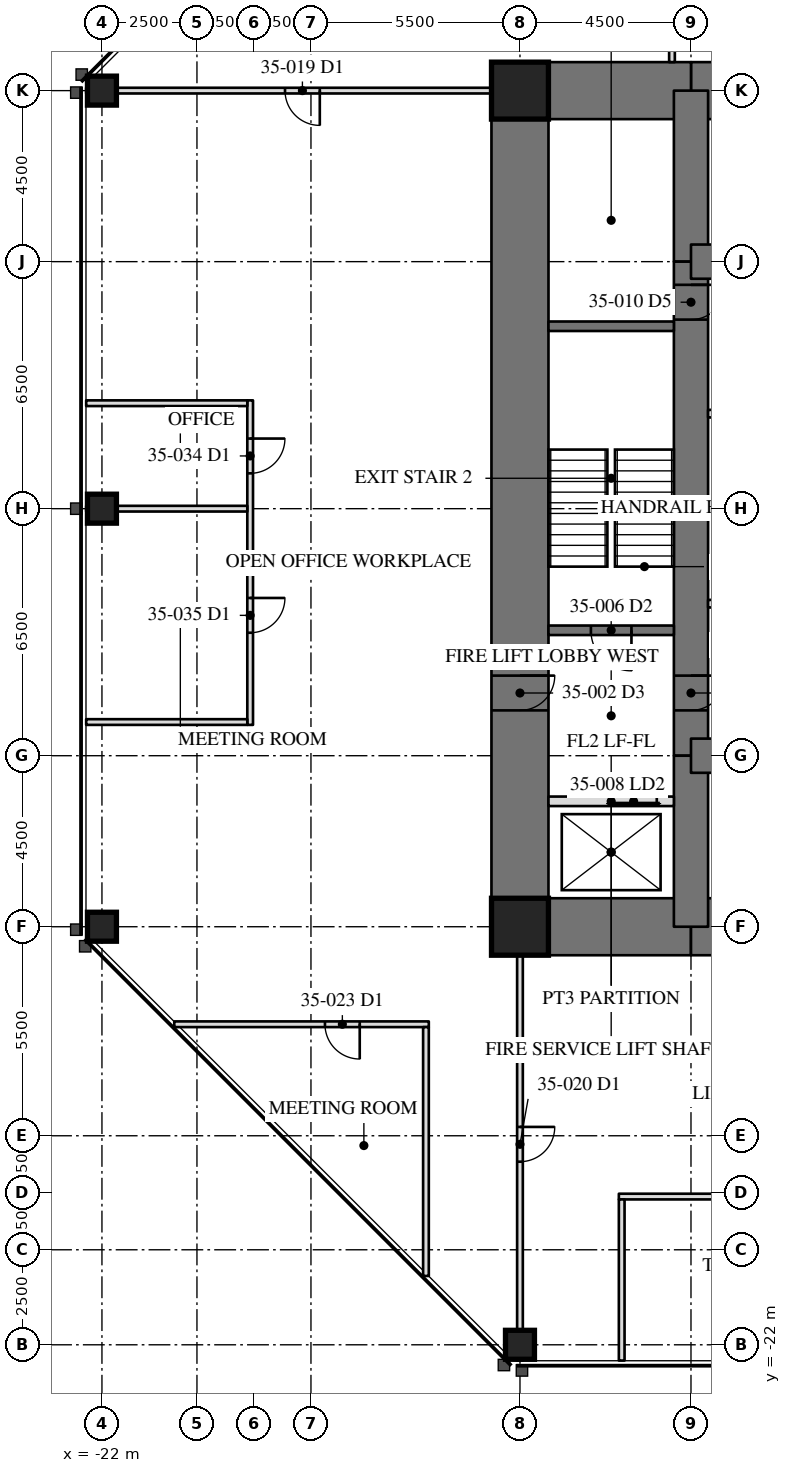
"""IFC4 building model, lengths in metres.
Left out: names, types, materials, properties, quantities, classifications, styles, units other than length and angle.
Written with IfcOpenShell. Run it as: python <this file> out.ifc"""

import sys

from ifc_helpers import new_model, si_unit, direction, frame, frame_2d, origin, origin_2d, place, context, subcontext, project, spatial, rectangle, hollow_rectangle, extrude, element, fill, save


model = new_model("IFC4")
c1 = context("Model", 3, precision=1e-05, world=origin(), true_north=direction((0.0, 1.0)))
c2 = subcontext(c1, "Body", "Model", "MODEL_VIEW")
j1 = project(units=[si_unit("LENGTHUNIT", "METRE"), si_unit("PLANEANGLEUNIT", "RADIAN")], contexts=[c1])
p1 = place(None, origin())
s1 = spatial("IfcSite", under=j1, at=p1, CompositionType="ELEMENT")
p2 = place(p1, origin())
s2 = spatial("IfcBuilding", under=s1, at=p2, CompositionType="ELEMENT")
p3 = place(p2, frame((0.0, 0.0, 150.0)))
s3 = spatial("IfcBuildingStorey", under=s2, at=p3, CompositionType="ELEMENT", Elevation=150.0)
for number, where, z_axis, x_axis in (
    (1, (-22.0, 0.0, 0.0), (0.0, 0.0, 1.0), (0.0, 1.0, 0.0)),
    (2, (-22.0, -11.0, 0.0), (0.0, 0.0, 1.0), (0.0, 1.0, 0.0)),
    (3, (-11.0, -22.0, 0.0), (0.0, 0.0, 1.0), (1.0, 0.0, 0.0)),
    (4, (-22.0, 11.0, 0.0), (0.0, 0.0, 1.0), (0.0, 1.0, 0.0)),
):
    element("IfcColumn", number, at=place(p3, frame(where, z_axis=z_axis, x_axis=x_axis)), inside=s3, PredefinedType="COLUMN", context=c2, shape_type="SweptSolid", body=[
        extrude(hollow_rectangle(XDim=0.762, YDim=0.762, WallThickness=0.076, at=origin_2d()), origin(), (0.0, 0.0, 1.0), 4.1),
    ])
p4 = place(p3, frame((-11.0, 11.0, 0.0), z_axis=(0.0, 0.0, 1.0), x_axis=(0.0, -1.0, 0.0)))
e5 = element("IfcWall", 5, at=p4, inside=s3, PredefinedType="SHEAR", context=c2, shape_type="SweptSolid", body=[
    extrude(rectangle(XDim=22.0, YDim=1.5, at=frame_2d((11.0, 0.0))), origin(), (0.0, 0.0, 1.0), 4.1),
])
p5 = place(p4, frame((15.393, 0.0, 0.0)))
e6 = element("IfcOpeningElement", 6, at=p5, cuts=e5, PredefinedType="OPENING", context=c2, shape_type="SweptSolid", body=[
    extrude(rectangle(XDim=0.915, YDim=2.134, at=frame_2d((0.458, 1.067))), frame((0.0, 0.76, 0.0), z_axis=(0.0, -1.0, 0.0), x_axis=(1.0, 0.0, 0.0)), (0.0, 0.0, 1.0), 1.52),
])
p6 = place(p3, frame((6.5, 11.0, 0.0), z_axis=(0.0, 0.0, 1.0), x_axis=(-1.0, 0.0, 0.0)))
e7 = element("IfcWall", 7, at=p6, inside=s3, PredefinedType="SHEAR", context=c2, shape_type="SweptSolid", body=[
    extrude(rectangle(XDim=13.0, YDim=1.5, at=frame_2d((6.5, 0.0))), origin(), (0.0, 0.0, 1.0), 4.1),
])
for number, where, z_axis, x_axis in (
    (8, (-6.5, 11.0, 0.0), (0.0, 0.0, 1.0), (-1.0, 0.0, 0.0)),
    (9, (-11.0, -11.0, 0.0), (0.0, 0.0, 1.0), (1.0, 0.0, 0.0)),
):
    element("IfcWall", number, at=place(p3, frame(where, z_axis=z_axis, x_axis=x_axis)), inside=s3, PredefinedType="SHEAR", context=c2, shape_type="SweptSolid", body=[
        extrude(rectangle(XDim=4.5, YDim=1.5, at=frame_2d((2.25, 0.0))), origin(), (0.0, 0.0, 1.0), 4.1),
    ])
p7 = place(p3, frame((-6.5, -11.0, 0.0), z_axis=(0.0, 0.0, 1.0), x_axis=(1.0, 0.0, 0.0)))
e10 = element("IfcWall", 10, at=p7, inside=s3, PredefinedType="SHEAR", context=c2, shape_type="SweptSolid", body=[
    extrude(rectangle(XDim=13.0, YDim=1.5, at=frame_2d((6.5, 0.0))), origin(), (0.0, 0.0, 1.0), 4.1),
])
p8 = place(p3, frame((-6.5, 11.0, 0.0), z_axis=(0.0, 0.0, 1.0), x_axis=(0.0, -1.0, 0.0)))
e11 = element("IfcWall", 11, at=p8, inside=s3, PredefinedType="SHEAR", context=c2, shape_type="SweptSolid", body=[
    extrude(rectangle(XDim=4.5, YDim=0.9, at=frame_2d((2.25, 0.0))), origin(), (0.0, 0.0, 1.0), 4.1),
])
p9 = place(p3, frame((-6.5, 6.5, 0.0), z_axis=(0.0, 0.0, 1.0), x_axis=(0.0, -1.0, 0.0)))
e12 = element("IfcWall", 12, at=p9, inside=s3, PredefinedType="SHEAR", context=c2, shape_type="SweptSolid", body=[
    extrude(rectangle(XDim=13.0, YDim=0.9, at=frame_2d((6.5, 0.0))), origin(), (0.0, 0.0, 1.0), 4.1),
])
p10 = place(p9, frame((10.893, 0.0, 0.0)))
e13 = element("IfcOpeningElement", 13, at=p10, cuts=e12, PredefinedType="OPENING", context=c2, shape_type="SweptSolid", body=[
    extrude(rectangle(XDim=0.915, YDim=2.134, at=frame_2d((0.458, 1.067))), frame((0.0, 0.46, 0.0), z_axis=(0.0, -1.0, 0.0), x_axis=(1.0, 0.0, 0.0)), (0.0, 0.0, 1.0), 0.92),
])
p11 = place(p9, frame((0.61, 0.0, 0.0)))
e14 = element("IfcOpeningElement", 14, at=p11, cuts=e12, PredefinedType="OPENING", context=c2, shape_type="SweptSolid", body=[
    extrude(rectangle(XDim=0.915, YDim=2.134, at=frame_2d((0.458, 1.067))), frame((0.0, 0.46, 0.0), z_axis=(0.0, -1.0, 0.0), x_axis=(1.0, 0.0, 0.0)), (0.0, 0.0, 1.0), 0.92),
])
p12 = place(p3, frame((-6.5, -6.5, 0.0), z_axis=(0.0, 0.0, 1.0), x_axis=(0.0, -1.0, 0.0)))
e15 = element("IfcWall", 15, at=p12, inside=s3, PredefinedType="SHEAR", context=c2, shape_type="SweptSolid", body=[
    extrude(rectangle(XDim=4.5, YDim=0.9, at=frame_2d((2.25, 0.0))), origin(), (0.0, 0.0, 1.0), 4.1),
])
p13 = place(p3, frame((6.5, 6.5, 0.0), z_axis=(0.0, 0.0, 1.0), x_axis=(-1.0, 0.0, 0.0)))
e16 = element("IfcWall", 16, at=p13, inside=s3, PredefinedType="SHEAR", context=c2, shape_type="SweptSolid", body=[
    extrude(rectangle(XDim=13.0, YDim=0.9, at=frame_2d((6.5, 0.0))), origin(), (0.0, 0.0, 1.0), 4.1),
])
p14 = place(p3, frame((-6.5, -6.5, 0.0), z_axis=(0.0, 0.0, 1.0), x_axis=(1.0, 0.0, 0.0)))
e17 = element("IfcWall", 17, at=p14, inside=s3, PredefinedType="SHEAR", context=c2, shape_type="SweptSolid", body=[
    extrude(rectangle(XDim=13.0, YDim=0.9, at=frame_2d((6.5, 0.0))), origin(), (0.0, 0.0, 1.0), 4.1),
])
p15 = place(p14, frame((1.267, 0.0, 0.0)))
e18 = element("IfcOpeningElement", 18, at=p15, cuts=e17, PredefinedType="OPENING", context=c2, shape_type="SweptSolid", body=[
    extrude(rectangle(XDim=1.067, YDim=2.134, at=frame_2d((0.533, 1.067))), frame((0.0, 0.46, 0.0), z_axis=(0.0, -1.0, 0.0), x_axis=(1.0, 0.0, 0.0)), (0.0, 0.0, 1.0), 0.92),
])
p16 = place(p14, frame((4.342, 0.0, 0.0)))
e19 = element("IfcOpeningElement", 19, at=p16, cuts=e17, PredefinedType="OPENING", context=c2, shape_type="SweptSolid", body=[
    extrude(rectangle(XDim=1.067, YDim=2.134, at=frame_2d((0.533, 1.067))), frame((0.0, 0.46, 0.0), z_axis=(0.0, -1.0, 0.0), x_axis=(1.0, 0.0, 0.0)), (0.0, 0.0, 1.0), 0.92),
])
p17 = place(p14, frame((7.592, 0.0, 0.0)))
e20 = element("IfcOpeningElement", 20, at=p17, cuts=e17, PredefinedType="OPENING", context=c2, shape_type="SweptSolid", body=[
    extrude(rectangle(XDim=1.067, YDim=2.134, at=frame_2d((0.533, 1.067))), frame((0.0, 0.46, 0.0), z_axis=(0.0, -1.0, 0.0), x_axis=(1.0, 0.0, 0.0)), (0.0, 0.0, 1.0), 0.92),
])
p18 = place(p14, frame((10.667, 0.0, 0.0)))
e21 = element("IfcOpeningElement", 21, at=p18, cuts=e17, PredefinedType="OPENING", context=c2, shape_type="SweptSolid", body=[
    extrude(rectangle(XDim=1.067, YDim=2.134, at=frame_2d((0.533, 1.067))), frame((0.0, 0.46, 0.0), z_axis=(0.0, -1.0, 0.0), x_axis=(1.0, 0.0, 0.0)), (0.0, 0.0, 1.0), 0.92),
])
for number, where, z_axis, x_axis in (
    (22, (-11.0, 11.0, 0.0), (0.0, 0.0, 1.0), (1.0, 0.0, 0.0)),
    (23, (-11.0, -11.0, 0.0), (0.0, 0.0, 1.0), (1.0, 0.0, 0.0)),
):
    element("IfcColumn", number, at=place(p3, frame(where, z_axis=z_axis, x_axis=x_axis)), inside=s3, PredefinedType="COLUMN", context=c2, shape_type="SweptSolid", body=[
        extrude(hollow_rectangle(XDim=1.499, YDim=1.499, WallThickness=0.102, at=origin_2d()), origin(), (0.0, 0.0, 1.0), 4.1),
    ])
p19 = place(p3, frame((-6.95, 4.8, 0.0), z_axis=(0.0, 0.0, 1.0), x_axis=(-1.0, 0.0, 0.0)))
e24 = element("IfcWall", 24, at=p19, inside=s3, PredefinedType="SOLIDWALL", context=c2, shape_type="SweptSolid", body=[
    extrude(rectangle(XDim=3.3, YDim=0.25, at=frame_2d((1.65, 0.0))), origin(), (0.0, 0.0, 1.0), 3.91),
])
p20 = place(p3, frame((-6.95, -3.2, 0.0), z_axis=(0.0, 0.0, 1.0), x_axis=(-1.0, 0.0, 0.0)))
e25 = element("IfcWall", 25, at=p20, inside=s3, PredefinedType="SOLIDWALL", context=c2, shape_type="SweptSolid", body=[
    extrude(rectangle(XDim=3.3, YDim=0.25, at=frame_2d((1.65, 0.0))), origin(), (0.0, 0.0, 1.0), 3.91),
])
p21 = place(p20, frame((1.116, 0.0, 0.0)))
e26 = element("IfcOpeningElement", 26, at=p21, cuts=e25, PredefinedType="OPENING", context=c2, shape_type="SweptSolid", body=[
    extrude(rectangle(XDim=1.067, YDim=2.134, at=frame_2d((0.533, 1.067))), frame((0.0, 0.135, 0.0), z_axis=(0.0, -1.0, 0.0), x_axis=(1.0, 0.0, 0.0)), (0.0, 0.0, 1.0), 0.27),
])
p22 = place(p3, frame((-6.95, -7.7, 0.0), z_axis=(0.0, 0.0, 1.0), x_axis=(-1.0, 0.0, 0.0)))
e27 = element("IfcWall", 27, at=p22, inside=s3, PredefinedType="PARTITIONING", context=c2, shape_type="SweptSolid", body=[
    extrude(rectangle(XDim=3.3, YDim=0.25, at=frame_2d((1.65, 0.0))), origin(), (0.0, 0.0, 1.0), 3.91),
])
p23 = place(p22, frame((0.45, 0.0, 0.0)))
e28 = element("IfcOpeningElement", 28, at=p23, cuts=e27, PredefinedType="OPENING", context=c2, shape_type="SweptSolid", body=[
    extrude(rectangle(XDim=1.219, YDim=2.134, at=frame_2d((0.609, 1.067))), frame((0.0, 0.135, 0.0), z_axis=(0.0, -1.0, 0.0), x_axis=(1.0, 0.0, 0.0)), (0.0, 0.0, 1.0), 0.27),
])
p24 = place(p3, frame((-6.05, 2.5, 0.0), z_axis=(0.0, 0.0, 1.0), x_axis=(1.0, 0.0, 0.0)))
e29 = element("IfcWall", 29, at=p24, inside=s3, PredefinedType="PARTITIONING", context=c2, shape_type="SweptSolid", body=[
    extrude(rectangle(XDim=12.1, YDim=0.2, at=frame_2d((6.05, 0.0))), origin(), (0.0, 0.0, 1.0), 3.91),
])
p25 = place(p24, frame((2.268, 0.0, 0.0)))
e30 = element("IfcOpeningElement", 30, at=p25, cuts=e29, PredefinedType="OPENING", context=c2, shape_type="SweptSolid", body=[
    extrude(rectangle(XDim=0.915, YDim=2.134, at=frame_2d((0.458, 1.067))), frame((0.0, 0.11, 0.0), z_axis=(0.0, -1.0, 0.0), x_axis=(1.0, 0.0, 0.0)), (0.0, 0.0, 1.0), 0.22),
])
p26 = place(p24, frame((10.617, 0.0, 0.0)))
e31 = element("IfcOpeningElement", 31, at=p26, cuts=e29, PredefinedType="OPENING", context=c2, shape_type="SweptSolid", body=[
    extrude(rectangle(XDim=0.915, YDim=2.134, at=frame_2d((0.458, 1.067))), frame((0.0, 0.11, 0.0), z_axis=(0.0, -1.0, 0.0), x_axis=(1.0, 0.0, 0.0)), (0.0, 0.0, 1.0), 0.22),
])
p27 = place(p3, frame((6.05, -2.5, 0.0), z_axis=(0.0, 0.0, 1.0), x_axis=(-1.0, 0.0, 0.0)))
e32 = element("IfcWall", 32, at=p27, inside=s3, PredefinedType="PARTITIONING", context=c2, shape_type="SweptSolid", body=[
    extrude(rectangle(XDim=12.1, YDim=0.2, at=frame_2d((6.05, 0.0))), origin(), (0.0, 0.0, 1.0), 3.91),
])
p28 = place(p27, frame((3.893, 0.0, 0.0)))
e33 = element("IfcOpeningElement", 33, at=p28, cuts=e32, PredefinedType="OPENING", context=c2, shape_type="SweptSolid", body=[
    extrude(rectangle(XDim=0.915, YDim=2.134, at=frame_2d((0.458, 1.067))), frame((0.0, 0.11, 0.0), z_axis=(0.0, -1.0, 0.0), x_axis=(1.0, 0.0, 0.0)), (0.0, 0.0, 1.0), 0.22),
])
p29 = place(p3, frame((-11.75, 11.0, 0.0), z_axis=(0.0, 0.0, 1.0), x_axis=(-1.0, 0.0, 0.0)))
e34 = element("IfcWall", 34, at=p29, inside=s3, PredefinedType="PARTITIONING", context=c2, shape_type="SweptSolid", body=[
    extrude(rectangle(XDim=10.665, YDim=0.15, at=frame_2d((5.333, 0.0))), origin(), (0.0, 0.0, 1.0), 3.326),
])
p30 = place(p29, frame((4.518, 0.0, 0.0)))
e35 = element("IfcOpeningElement", 35, at=p30, cuts=e34, PredefinedType="OPENING", context=c2, shape_type="SweptSolid", body=[
    extrude(rectangle(XDim=0.915, YDim=2.134, at=frame_2d((0.458, 1.067))), frame((0.0, 0.085, 0.0), z_axis=(0.0, -1.0, 0.0), x_axis=(1.0, 0.0, 0.0)), (0.0, 0.0, 1.0), 0.17),
])
p31 = place(p3, frame((-11.0, -11.75, 0.0), z_axis=(0.0, 0.0, 1.0), x_axis=(0.0, -1.0, 0.0)))
e36 = element("IfcWall", 36, at=p31, inside=s3, PredefinedType="PARTITIONING", context=c2, shape_type="SweptSolid", body=[
    extrude(rectangle(XDim=10.665, YDim=0.15, at=frame_2d((5.333, 0.0))), origin(), (0.0, 0.0, 1.0), 3.326),
])
p32 = place(p31, frame((4.518, 0.0, 0.0)))
e37 = element("IfcOpeningElement", 37, at=p32, cuts=e36, PredefinedType="OPENING", context=c2, shape_type="SweptSolid", body=[
    extrude(rectangle(XDim=0.915, YDim=2.134, at=frame_2d((0.458, 1.067))), frame((0.0, 0.085, 0.0), z_axis=(0.0, -1.0, 0.0), x_axis=(1.0, 0.0, 0.0)), (0.0, 0.0, 1.0), 0.17),
])
p33 = place(p3, frame((-13.399, -13.566, 0.0), z_axis=(0.0, 0.0, 1.0), x_axis=(-1.0, 0.0, 0.0)))
e38 = element("IfcWall", 38, at=p33, inside=s3, PredefinedType="PARTITIONING", context=c2, shape_type="SweptSolid", body=[
    extrude(rectangle(XDim=6.698, YDim=0.15, at=frame_2d((3.349, 0.0))), origin(), (0.0, 0.0, 1.0), 3.91),
])
p34 = place(p33, frame((1.817, 0.0, 0.0)))
e39 = element("IfcOpeningElement", 39, at=p34, cuts=e38, PredefinedType="OPENING", context=c2, shape_type="SweptSolid", body=[
    extrude(rectangle(XDim=0.915, YDim=2.134, at=frame_2d((0.458, 1.067))), frame((0.0, 0.085, 0.0), z_axis=(0.0, -1.0, 0.0), x_axis=(1.0, 0.0, 0.0)), (0.0, 0.0, 1.0), 0.17),
])
p35 = place(p3, frame((-13.474, -13.641, 0.0), z_axis=(0.0, 0.0, 1.0), x_axis=(0.0, -1.0, 0.0)))
e40 = element("IfcWall", 40, at=p35, inside=s3, PredefinedType="PARTITIONING", context=c2, shape_type="SweptSolid", body=[
    extrude(rectangle(XDim=6.548, YDim=0.15, at=frame_2d((3.274, 0.0))), origin(), (0.0, 0.0, 1.0), 3.91),
])
p36 = place(p3, frame((-8.398, -18.1, 0.0), z_axis=(0.0, 0.0, 1.0), x_axis=(1.0, 0.0, 0.0)))
e41 = element("IfcWall", 41, at=p36, inside=s3, PredefinedType="PARTITIONING", context=c2, shape_type="SweptSolid", body=[
    extrude(rectangle(XDim=16.894, YDim=0.15, at=frame_2d((8.447, 0.0))), origin(), (0.0, 0.0, 1.0), 3.91),
])
p37 = place(p36, frame((3.779, 0.0, 0.0)))
e42 = element("IfcOpeningElement", 42, at=p37, cuts=e41, PredefinedType="OPENING", context=c2, shape_type="SweptSolid", body=[
    extrude(rectangle(XDim=0.915, YDim=2.134, at=frame_2d((0.458, 1.067))), frame((0.0, 0.085, 0.0), z_axis=(0.0, -1.0, 0.0), x_axis=(1.0, 0.0, 0.0)), (0.0, 0.0, 1.0), 0.17),
])
p38 = place(p36, frame((10.748, 0.0, 0.0)))
e43 = element("IfcOpeningElement", 43, at=p38, cuts=e41, PredefinedType="OPENING", context=c2, shape_type="SweptSolid", body=[
    extrude(rectangle(XDim=0.915, YDim=2.134, at=frame_2d((0.458, 1.067))), frame((0.0, 0.085, 0.0), z_axis=(0.0, -1.0, 0.0), x_axis=(1.0, 0.0, 0.0)), (0.0, 0.0, 1.0), 0.17),
])
p39 = place(p36, frame((14.958, 0.0, 0.0)))
e44 = element("IfcOpeningElement", 44, at=p39, cuts=e41, PredefinedType="OPENING", context=c2, shape_type="SweptSolid", body=[
    extrude(rectangle(XDim=0.915, YDim=2.134, at=frame_2d((0.458, 1.067))), frame((0.0, 0.085, 0.0), z_axis=(0.0, -1.0, 0.0), x_axis=(1.0, 0.0, 0.0)), (0.0, 0.0, 1.0), 0.17),
])
p40 = place(p3, frame((-8.323, -18.175, 0.0), z_axis=(0.0, 0.0, 1.0), x_axis=(0.0, -1.0, 0.0)))
e45 = element("IfcWall", 45, at=p40, inside=s3, PredefinedType="PARTITIONING", context=c2, shape_type="SweptSolid", body=[
    extrude(rectangle(XDim=4.24, YDim=0.15, at=frame_2d((2.12, 0.0))), origin(), (0.0, 0.0, 1.0), 3.91),
])
p41 = place(p3, frame((-18.1, 2.85, 0.0), z_axis=(0.0, 0.0, 1.0), x_axis=(0.0, -1.0, 0.0)))
e46 = element("IfcWall", 46, at=p41, inside=s3, PredefinedType="PARTITIONING", context=c2, shape_type="SweptSolid", body=[
    extrude(rectangle(XDim=8.539, YDim=0.15, at=frame_2d((4.27, 0.0))), origin(), (0.0, 0.0, 1.0), 3.91),
])
p42 = place(p41, frame((1.005, 0.0, 0.0)))
e47 = element("IfcOpeningElement", 47, at=p42, cuts=e46, PredefinedType="OPENING", context=c2, shape_type="SweptSolid", body=[
    extrude(rectangle(XDim=0.915, YDim=2.134, at=frame_2d((0.458, 1.067))), frame((0.0, 0.085, 0.0), z_axis=(0.0, -1.0, 0.0), x_axis=(1.0, 0.0, 0.0)), (0.0, 0.0, 1.0), 0.17),
])
p43 = place(p41, frame((5.199, 0.0, 0.0)))
e48 = element("IfcOpeningElement", 48, at=p43, cuts=e46, PredefinedType="OPENING", context=c2, shape_type="SweptSolid", body=[
    extrude(rectangle(XDim=0.915, YDim=2.134, at=frame_2d((0.458, 1.067))), frame((0.0, 0.085, 0.0), z_axis=(0.0, -1.0, 0.0), x_axis=(1.0, 0.0, 0.0)), (0.0, 0.0, 1.0), 0.17),
])
p44 = place(p3, frame((-18.175, 2.775, 0.0), z_axis=(0.0, 0.0, 1.0), x_axis=(-1.0, 0.0, 0.0)))
e49 = element("IfcWall", 49, at=p44, inside=s3, PredefinedType="PARTITIONING", context=c2, shape_type="SweptSolid", body=[
    extrude(rectangle(XDim=4.24, YDim=0.15, at=frame_2d((2.12, 0.0))), origin(), (0.0, 0.0, 1.0), 3.91),
])
p45 = place(p3, frame((-18.175, 0.0, 0.0), z_axis=(0.0, 0.0, 1.0), x_axis=(-1.0, 0.0, 0.0)))
e50 = element("IfcWall", 50, at=p45, inside=s3, PredefinedType="PARTITIONING", context=c2, shape_type="SweptSolid", body=[
    extrude(rectangle(XDim=4.24, YDim=0.15, at=frame_2d((2.12, 0.0))), origin(), (0.0, 0.0, 1.0), 3.326),
])
p46 = place(p3, frame((-18.175, -5.614, 0.0), z_axis=(0.0, 0.0, 1.0), x_axis=(-1.0, 0.0, 0.0)))
e51 = element("IfcWall", 51, at=p46, inside=s3, PredefinedType="PARTITIONING", context=c2, shape_type="SweptSolid", body=[
    extrude(rectangle(XDim=4.24, YDim=0.15, at=frame_2d((2.12, 0.0))), origin(), (0.0, 0.0, 1.0), 3.91),
])
p47 = place(p3, frame((-7.0, 14.675, 0.0), z_axis=(0.0, 0.0, 1.0), x_axis=(0.0, -1.0, 0.0)))
e52 = element("IfcWall", 52, at=p47, inside=s3, PredefinedType="PARTITIONING", context=c2, shape_type="SweptSolid", body=[
    extrude(rectangle(XDim=2.925, YDim=0.15, at=frame_2d((1.462, 0.0))), origin(), (0.0, 0.0, 1.0), 3.91),
])
p48 = place(p5, origin())
e53 = element("IfcDoor", 53, at=p48, inside=s3, OperationType="SINGLE_SWING_RIGHT", PredefinedType="DOOR", context=c2, shape_type="SweptSolid", body=[
    extrude(rectangle(XDim=0.915, YDim=2.134, at=frame_2d((0.458, 1.067))), frame((0.0, -0.675, 0.0), z_axis=(0.0, -1.0, 0.0), x_axis=(1.0, 0.0, 0.0)), (0.0, 0.0, 1.0), 0.05),
])
fill(e6, e53)
p49 = place(p10, origin())
e54 = element("IfcDoor", 54, at=p49, inside=s3, OperationType="SINGLE_SWING_RIGHT", PredefinedType="DOOR", context=c2, shape_type="SweptSolid", body=[
    extrude(rectangle(XDim=0.915, YDim=2.134, at=frame_2d((0.458, 1.067))), frame((0.0, -0.375, 0.0), z_axis=(0.0, -1.0, 0.0), x_axis=(1.0, 0.0, 0.0)), (0.0, 0.0, 1.0), 0.05),
])
fill(e13, e54)
p50 = place(p21, origin())
e55 = element("IfcDoor", 55, at=p50, inside=s3, OperationType="SINGLE_SWING_LEFT", PredefinedType="DOOR", context=c2, shape_type="SweptSolid", body=[
    extrude(rectangle(XDim=1.067, YDim=2.134, at=frame_2d((0.533, 1.067))), frame((0.0, 0.025, 0.0), z_axis=(0.0, -1.0, 0.0), x_axis=(1.0, 0.0, 0.0)), (0.0, 0.0, 1.0), 0.05),
])
fill(e26, e55)
p51 = place(p23, origin())
e56 = element("IfcDoor", 56, at=p51, inside=s3, OperationType="SLIDING_TO_LEFT", PredefinedType="DOOR", context=c2, shape_type="SweptSolid", body=[
    extrude(rectangle(XDim=1.219, YDim=2.134, at=frame_2d((0.609, 1.067))), frame((0.0, 0.025, 0.0), z_axis=(0.0, -1.0, 0.0), x_axis=(1.0, 0.0, 0.0)), (0.0, 0.0, 1.0), 0.05),
])
fill(e28, e56)
p52 = place(p11, origin())
e57 = element("IfcDoor", 57, at=p52, inside=s3, OperationType="SINGLE_SWING_RIGHT", PredefinedType="DOOR", context=c2, shape_type="SweptSolid", body=[
    extrude(rectangle(XDim=0.915, YDim=2.134, at=frame_2d((0.458, 1.067))), frame((0.0, -0.375, 0.0), z_axis=(0.0, -1.0, 0.0), x_axis=(1.0, 0.0, 0.0)), (0.0, 0.0, 1.0), 0.05),
])
fill(e14, e57)
p53 = place(p30, origin())
e58 = element("IfcDoor", 58, at=p53, inside=s3, OperationType="SINGLE_SWING_LEFT", PredefinedType="DOOR", context=c2, shape_type="SweptSolid", body=[
    extrude(rectangle(XDim=0.915, YDim=2.134, at=frame_2d((0.458, 1.067))), frame((0.0, 0.025, 0.0), z_axis=(0.0, -1.0, 0.0), x_axis=(1.0, 0.0, 0.0)), (0.0, 0.0, 1.0), 0.05),
])
fill(e35, e58)
p54 = place(p32, origin())
e59 = element("IfcDoor", 59, at=p54, inside=s3, OperationType="SINGLE_SWING_LEFT", PredefinedType="DOOR", context=c2, shape_type="SweptSolid", body=[
    extrude(rectangle(XDim=0.915, YDim=2.134, at=frame_2d((0.458, 1.067))), frame((0.0, 0.025, 0.0), z_axis=(0.0, -1.0, 0.0), x_axis=(1.0, 0.0, 0.0)), (0.0, 0.0, 1.0), 0.05),
])
fill(e37, e59)
p55 = place(p34, origin())
e60 = element("IfcDoor", 60, at=p55, inside=s3, OperationType="SINGLE_SWING_LEFT", PredefinedType="DOOR", context=c2, shape_type="SweptSolid", body=[
    extrude(rectangle(XDim=0.915, YDim=2.134, at=frame_2d((0.458, 1.067))), frame((0.0, 0.025, 0.0), z_axis=(0.0, -1.0, 0.0), x_axis=(1.0, 0.0, 0.0)), (0.0, 0.0, 1.0), 0.05),
])
fill(e39, e60)
p56 = place(p42, origin())
e61 = element("IfcDoor", 61, at=p56, inside=s3, OperationType="SINGLE_SWING_LEFT", PredefinedType="DOOR", context=c2, shape_type="SweptSolid", body=[
    extrude(rectangle(XDim=0.915, YDim=2.134, at=frame_2d((0.458, 1.067))), frame((0.0, 0.025, 0.0), z_axis=(0.0, -1.0, 0.0), x_axis=(1.0, 0.0, 0.0)), (0.0, 0.0, 1.0), 0.05),
])
fill(e47, e61)
p57 = place(p43, origin())
e62 = element("IfcDoor", 62, at=p57, inside=s3, OperationType="SINGLE_SWING_LEFT", PredefinedType="DOOR", context=c2, shape_type="SweptSolid", body=[
    extrude(rectangle(XDim=0.915, YDim=2.134, at=frame_2d((0.458, 1.067))), frame((0.0, 0.025, 0.0), z_axis=(0.0, -1.0, 0.0), x_axis=(1.0, 0.0, 0.0)), (0.0, 0.0, 1.0), 0.05),
])
fill(e48, e62)
save(model, sys.argv[1])
